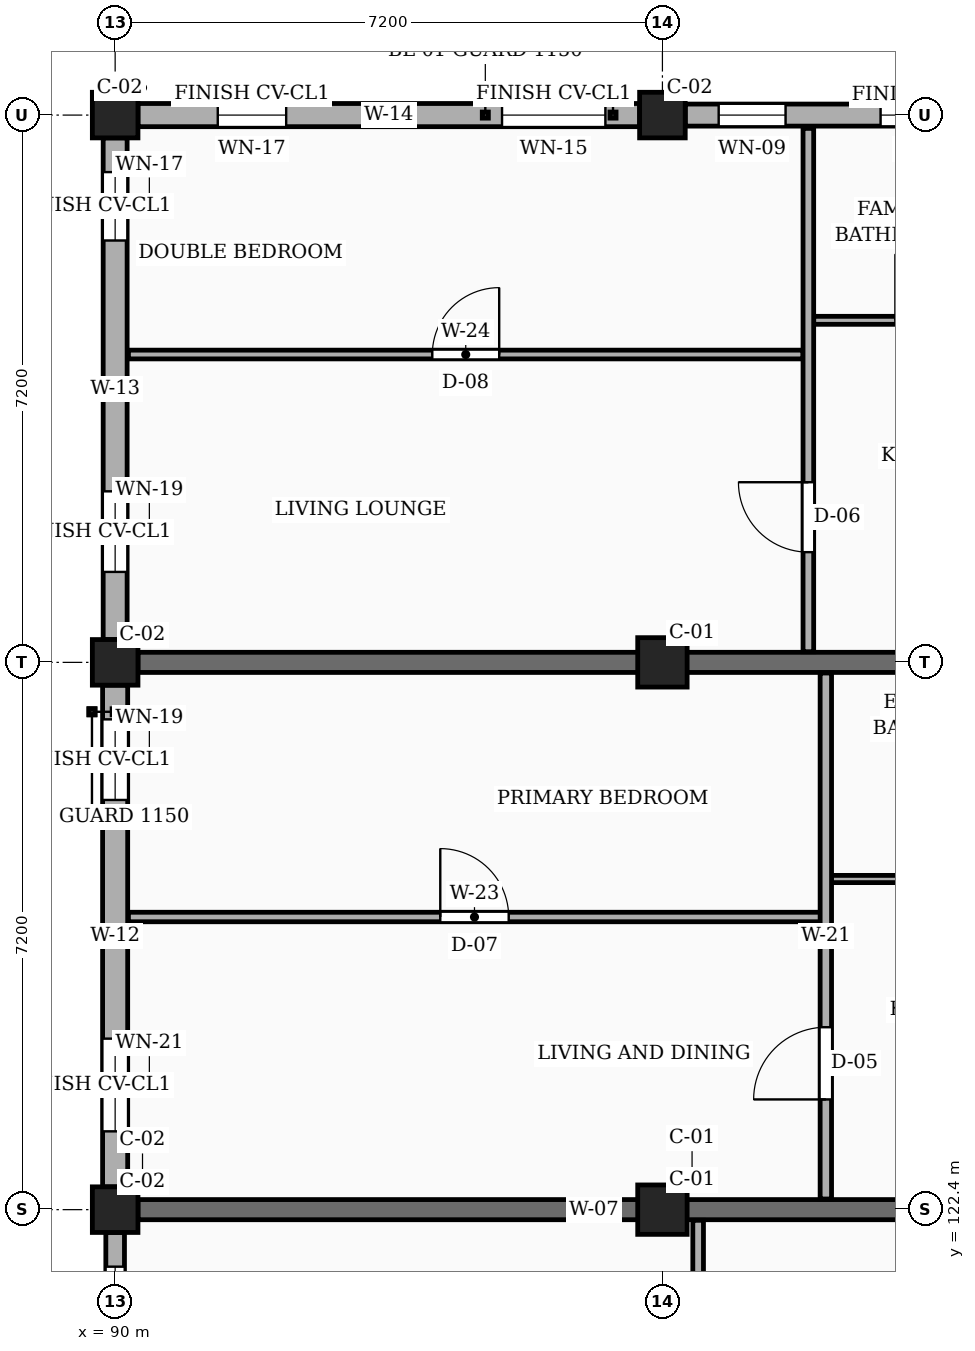
"""IFC4 building model, lengths in metres.
Left out: names, types, materials, properties, quantities, classifications, styles, units other than length and angle.
Written with IfcOpenShell. Run it as: python <this file> out.ifc"""

import sys

from ifc_helpers import new_model, si_unit, direction, frame, frame_2d, origin, origin_2d, place, context, subcontext, project, spatial, rectangle, extrude, element, fill, save


model = new_model("IFC4")
c1 = context("Model", 3, precision=1e-05, world=origin(), true_north=direction((0.0, 1.0)))
c2 = subcontext(c1, "Body", "Model", "MODEL_VIEW")
j1 = project(units=[si_unit("LENGTHUNIT", "METRE"), si_unit("PLANEANGLEUNIT", "RADIAN")], contexts=[c1])
p1 = place(None, origin())
s1 = spatial("IfcSite", under=j1, at=p1, CompositionType="ELEMENT")
p2 = place(p1, origin())
s2 = spatial("IfcBuilding", under=s1, at=p2, CompositionType="ELEMENT")
p3 = place(p2, frame((0.0, 0.0, 7.65)))
s3 = spatial("IfcBuildingStorey", under=s2, at=p3, CompositionType="ELEMENT", Elevation=7.65)
for number, where, z_axis, x_axis in (
    (1, (90.0, 122.4, 0.0), (0.0, 0.0, 1.0), (1.0, 0.0, 0.0)),
    (2, (90.0, 129.6, 0.0), (0.0, 0.0, 1.0), (1.0, 0.0, 0.0)),
    (3, (90.0, 136.8, 0.0), (0.0, 0.0, 1.0), (1.0, 0.0, 0.0)),
):
    element("IfcColumn", number, at=place(p3, frame(where, z_axis=z_axis, x_axis=x_axis)), inside=s3, PredefinedType="COLUMN", context=c2, shape_type="SweptSolid", body=[
        extrude(rectangle(XDim=0.6, YDim=0.6, at=origin_2d()), origin(), (0.0, 0.0, 1.0), 3.15),
    ])
for number, where, z_axis, x_axis in (
    (4, (97.2, 122.4, 0.0), (0.0, 0.0, 1.0), (1.0, 0.0, 0.0)),
    (5, (97.2, 129.6, 0.0), (0.0, 0.0, 1.0), (1.0, 0.0, 0.0)),
):
    element("IfcColumn", number, at=place(p3, frame(where, z_axis=z_axis, x_axis=x_axis)), inside=s3, PredefinedType="COLUMN", context=c2, shape_type="SweptSolid", body=[
        extrude(rectangle(XDim=0.65, YDim=0.65, at=origin_2d()), origin(), (0.0, 0.0, 1.0), 3.15),
    ])
p4 = place(p3, frame((97.2, 136.8, 0.0), z_axis=(0.0, 0.0, 1.0), x_axis=(1.0, 0.0, 0.0)))
e6 = element("IfcColumn", 6, at=p4, inside=s3, PredefinedType="COLUMN", context=c2, shape_type="SweptSolid", body=[
    extrude(rectangle(XDim=0.6, YDim=0.6, at=origin_2d()), origin(), (0.0, 0.0, 1.0), 3.15),
])
for number, where, z_axis, x_axis in (
    (7, (90.3, 122.4, 0.0), (0.0, 0.0, 1.0), (1.0, 0.0, 0.0)),
    (8, (90.3, 129.6, 0.0), (0.0, 0.0, 1.0), (1.0, 0.0, 0.0)),
):
    element("IfcWall", number, at=place(p3, frame(where, z_axis=z_axis, x_axis=x_axis)), inside=s3, PredefinedType="SOLIDWALL", context=c2, shape_type="SweptSolid", body=[
        extrude(rectangle(XDim=12.0, YDim=0.265, at=frame_2d((6.0, 0.0))), origin(), (0.0, 0.0, 1.0), 2.19),
    ])
p5 = place(p3, frame((104.1, 136.8, 0.0), z_axis=(0.0, 0.0, 1.0), x_axis=(-1.0, 0.0, 0.0)))
e9 = element("IfcWall", 9, at=p5, inside=s3, PredefinedType="SOLIDWALL", context=c2, shape_type="SweptSolid", body=[
    extrude(rectangle(XDim=6.6, YDim=0.29, at=frame_2d((3.3, 0.0))), origin(), (0.0, 0.0, 1.0), 2.46),
])
p6 = place(p5, frame((0.41, 0.0, 0.78)))
e10 = element("IfcOpeningElement", 10, at=p6, cuts=e9, PredefinedType="OPENING", context=c2, shape_type="SweptSolid", body=[
    extrude(rectangle(XDim=1.12, YDim=1.26, at=frame_2d((0.56, 0.63))), frame((0.0, 0.155, 0.0), z_axis=(0.0, -1.0, 0.0), x_axis=(1.0, 0.0, 0.0)), (0.0, 0.0, 1.0), 0.31),
])
p7 = place(p5, frame((2.75, 0.0, 0.78)))
e11 = element("IfcOpeningElement", 11, at=p7, cuts=e9, PredefinedType="OPENING", context=c2, shape_type="SweptSolid", body=[
    extrude(rectangle(XDim=1.28, YDim=1.26, at=frame_2d((0.64, 0.63))), frame((0.0, 0.155, 0.0), z_axis=(0.0, -1.0, 0.0), x_axis=(1.0, 0.0, 0.0)), (0.0, 0.0, 1.0), 0.31),
])
p8 = place(p5, frame((5.28, 0.0, 0.78)))
e12 = element("IfcOpeningElement", 12, at=p8, cuts=e9, PredefinedType="OPENING", context=c2, shape_type="SweptSolid", body=[
    extrude(rectangle(XDim=0.88, YDim=1.26, at=frame_2d((0.44, 0.63))), frame((0.0, 0.155, 0.0), z_axis=(0.0, -1.0, 0.0), x_axis=(1.0, 0.0, 0.0)), (0.0, 0.0, 1.0), 0.31),
])
p9 = place(p3, frame((96.9, 136.8, 0.0), z_axis=(0.0, 0.0, 1.0), x_axis=(-1.0, 0.0, 0.0)))
e13 = element("IfcWall", 13, at=p9, inside=s3, PredefinedType="SOLIDWALL", context=c2, shape_type="SweptSolid", body=[
    extrude(rectangle(XDim=6.6, YDim=0.305, at=frame_2d((3.3, 0.0))), origin(), (0.0, 0.0, 1.0), 2.46),
])
p10 = place(p9, frame((0.45, 0.0, 0.78)))
e14 = element("IfcOpeningElement", 14, at=p10, cuts=e13, PredefinedType="OPENING", context=c2, shape_type="SweptSolid", body=[
    extrude(rectangle(XDim=1.36, YDim=1.26, at=frame_2d((0.68, 0.63))), frame((0.0, 0.163, 0.0), z_axis=(0.0, -1.0, 0.0), x_axis=(1.0, 0.0, 0.0)), (0.0, 0.0, 1.0), 0.325),
])
p11 = place(p9, frame((4.65, 0.0, 0.78)))
e15 = element("IfcOpeningElement", 15, at=p11, cuts=e13, PredefinedType="OPENING", context=c2, shape_type="SweptSolid", body=[
    extrude(rectangle(XDim=0.9, YDim=1.36, at=frame_2d((0.45, 0.68))), frame((0.0, 0.163, 0.0), z_axis=(0.0, -1.0, 0.0), x_axis=(1.0, 0.0, 0.0)), (0.0, 0.0, 1.0), 0.325),
])
p12 = place(p3, frame((90.0, 136.5, 0.0), z_axis=(0.0, 0.0, 1.0), x_axis=(0.0, -1.0, 0.0)))
e16 = element("IfcWall", 16, at=p12, inside=s3, PredefinedType="SOLIDWALL", context=c2, shape_type="SweptSolid", body=[
    extrude(rectangle(XDim=6.6, YDim=0.315, at=frame_2d((3.3, 0.0))), origin(), (0.0, 0.0, 1.0), 2.46),
])
p13 = place(p12, frame((0.45, 0.0, 0.78)))
e17 = element("IfcOpeningElement", 17, at=p13, cuts=e16, PredefinedType="OPENING", context=c2, shape_type="SweptSolid", body=[
    extrude(rectangle(XDim=0.9, YDim=1.36, at=frame_2d((0.45, 0.68))), frame((0.0, 0.167, 0.0), z_axis=(0.0, -1.0, 0.0), x_axis=(1.0, 0.0, 0.0)), (0.0, 0.0, 1.0), 0.335),
])
p14 = place(p12, frame((4.65, 0.0, 0.78)))
e18 = element("IfcOpeningElement", 18, at=p14, cuts=e16, PredefinedType="OPENING", context=c2, shape_type="SweptSolid", body=[
    extrude(rectangle(XDim=1.06, YDim=1.36, at=frame_2d((0.53, 0.68))), frame((0.0, 0.167, 0.0), z_axis=(0.0, -1.0, 0.0), x_axis=(1.0, 0.0, 0.0)), (0.0, 0.0, 1.0), 0.335),
])
p15 = place(p3, frame((90.0, 129.3, 0.0), z_axis=(0.0, 0.0, 1.0), x_axis=(0.0, -1.0, 0.0)))
e19 = element("IfcWall", 19, at=p15, inside=s3, PredefinedType="SOLIDWALL", context=c2, shape_type="SweptSolid", body=[
    extrude(rectangle(XDim=6.6, YDim=0.33, at=frame_2d((3.3, 0.0))), origin(), (0.0, 0.0, 1.0), 2.46),
])
p16 = place(p15, frame((0.45, 0.0, 0.78)))
e20 = element("IfcOpeningElement", 20, at=p16, cuts=e19, PredefinedType="OPENING", context=c2, shape_type="SweptSolid", body=[
    extrude(rectangle(XDim=1.06, YDim=1.36, at=frame_2d((0.53, 0.68))), frame((0.0, 0.175, 0.0), z_axis=(0.0, -1.0, 0.0), x_axis=(1.0, 0.0, 0.0)), (0.0, 0.0, 1.0), 0.35),
])
p17 = place(p15, frame((4.65, 0.0, 0.78)))
e21 = element("IfcOpeningElement", 21, at=p17, cuts=e19, PredefinedType="OPENING", context=c2, shape_type="SweptSolid", body=[
    extrude(rectangle(XDim=1.22, YDim=1.36, at=frame_2d((0.61, 0.68))), frame((0.0, 0.175, 0.0), z_axis=(0.0, -1.0, 0.0), x_axis=(1.0, 0.0, 0.0)), (0.0, 0.0, 1.0), 0.35),
])
p18 = place(p3, frame((90.0, 122.1, 0.0), z_axis=(0.0, 0.0, 1.0), x_axis=(0.0, -1.0, 0.0)))
e22 = element("IfcWall", 22, at=p18, inside=s3, PredefinedType="SOLIDWALL", context=c2, shape_type="SweptSolid", body=[
    extrude(rectangle(XDim=6.6, YDim=0.245, at=frame_2d((3.3, 0.0))), origin(), (0.0, 0.0, 1.0), 2.46),
])
p19 = place(p18, frame((0.45, 0.0, 0.78)))
e23 = element("IfcOpeningElement", 23, at=p19, cuts=e22, PredefinedType="OPENING", context=c2, shape_type="SweptSolid", body=[
    extrude(rectangle(XDim=1.22, YDim=1.36, at=frame_2d((0.61, 0.68))), frame((0.0, 0.133, 0.0), z_axis=(0.0, -1.0, 0.0), x_axis=(1.0, 0.0, 0.0)), (0.0, 0.0, 1.0), 0.265),
])
p20 = place(p18, frame((4.65, 0.0, 0.78)))
e24 = element("IfcOpeningElement", 24, at=p20, cuts=e22, PredefinedType="OPENING", context=c2, shape_type="SweptSolid", body=[
    extrude(rectangle(XDim=1.38, YDim=1.36, at=frame_2d((0.69, 0.68))), frame((0.0, 0.133, 0.0), z_axis=(0.0, -1.0, 0.0), x_axis=(1.0, 0.0, 0.0)), (0.0, 0.0, 1.0), 0.265),
])
p21 = place(p3, frame((97.67, 115.34, 0.0), z_axis=(0.0, 0.0, 1.0), x_axis=(0.0, 1.0, 0.0)))
e25 = element("IfcWall", 25, at=p21, inside=s3, PredefinedType="PARTITIONING", context=c2, shape_type="SweptSolid", body=[
    extrude(rectangle(XDim=6.92, YDim=0.14, at=frame_2d((3.46, 0.0))), origin(), (0.0, 0.0, 1.0), 2.325),
])
p22 = place(p21, frame((4.66, 0.0, 0.0)))
e26 = element("IfcOpeningElement", 26, at=p22, cuts=e25, PredefinedType="OPENING", context=c2, shape_type="SweptSolid", body=[
    extrude(rectangle(XDim=0.95, YDim=2.1, at=frame_2d((0.475, 1.05))), frame((0.0, 0.08, 0.0), z_axis=(0.0, -1.0, 0.0), x_axis=(1.0, 0.0, 0.0)), (0.0, 0.0, 1.0), 0.16),
])
p23 = place(p3, frame((90.175, 126.25, 0.0), z_axis=(0.0, 0.0, 1.0), x_axis=(1.0, 0.0, 0.0)))
e27 = element("IfcWall", 27, at=p23, inside=s3, PredefinedType="PARTITIONING", context=c2, shape_type="SweptSolid", body=[
    extrude(rectangle(XDim=9.105, YDim=0.125, at=frame_2d((4.552, 0.0))), origin(), (0.0, 0.0, 1.0), 2.325),
])
p24 = place(p23, frame((4.103, 0.0, 0.0)))
e28 = element("IfcOpeningElement", 28, at=p24, cuts=e27, PredefinedType="OPENING", context=c2, shape_type="SweptSolid", body=[
    extrude(rectangle(XDim=0.9, YDim=2.1, at=frame_2d((0.45, 1.05))), frame((0.0, 0.073, 0.0), z_axis=(0.0, -1.0, 0.0), x_axis=(1.0, 0.0, 0.0)), (0.0, 0.0, 1.0), 0.145),
])
p25 = place(p3, frame((99.42, 126.75, 0.0), z_axis=(0.0, 0.0, 1.0), x_axis=(1.0, 0.0, 0.0)))
e29 = element("IfcWall", 29, at=p25, inside=s3, PredefinedType="PARTITIONING", context=c2, shape_type="SweptSolid", body=[
    extrude(rectangle(XDim=2.79, YDim=0.095, at=frame_2d((1.395, 0.0))), origin(), (0.0, 0.0, 1.0), 2.325),
])
p26 = place(p25, frame((0.945, 0.0, 0.0)))
e30 = element("IfcOpeningElement", 30, at=p26, cuts=e29, PredefinedType="OPENING", context=c2, shape_type="SweptSolid", body=[
    extrude(rectangle(XDim=0.9, YDim=2.05, at=frame_2d((0.45, 1.025))), frame((0.0, 0.058, 0.0), z_axis=(0.0, -1.0, 0.0), x_axis=(1.0, 0.0, 0.0)), (0.0, 0.0, 1.0), 0.115),
])
p27 = place(p3, frame((99.35, 122.54, 0.0), z_axis=(0.0, 0.0, 1.0), x_axis=(0.0, 1.0, 0.0)))
e31 = element("IfcWall", 31, at=p27, inside=s3, PredefinedType="PARTITIONING", context=c2, shape_type="SweptSolid", body=[
    extrude(rectangle(XDim=6.92, YDim=0.15, at=frame_2d((3.46, 0.0))), origin(), (0.0, 0.0, 1.0), 2.325),
])
p28 = place(p27, frame((1.31, 0.0, 0.0)))
e32 = element("IfcOpeningElement", 32, at=p28, cuts=e31, PredefinedType="OPENING", context=c2, shape_type="SweptSolid", body=[
    extrude(rectangle(XDim=0.95, YDim=2.1, at=frame_2d((0.475, 1.05))), frame((0.0, 0.085, 0.0), z_axis=(0.0, -1.0, 0.0), x_axis=(1.0, 0.0, 0.0)), (0.0, 0.0, 1.0), 0.17),
])
p29 = place(p3, frame((90.175, 133.65, 0.0), z_axis=(0.0, 0.0, 1.0), x_axis=(1.0, 0.0, 0.0)))
e33 = element("IfcWall", 33, at=p29, inside=s3, PredefinedType="PARTITIONING", context=c2, shape_type="SweptSolid", body=[
    extrude(rectangle(XDim=8.875, YDim=0.115, at=frame_2d((4.438, 0.0))), origin(), (0.0, 0.0, 1.0), 2.325),
])
p30 = place(p29, frame((3.998, 0.0, 0.0)))
e34 = element("IfcOpeningElement", 34, at=p30, cuts=e33, PredefinedType="OPENING", context=c2, shape_type="SweptSolid", body=[
    extrude(rectangle(XDim=0.88, YDim=2.08, at=frame_2d((0.44, 1.04))), frame((0.0, 0.067, 0.0), z_axis=(0.0, -1.0, 0.0), x_axis=(1.0, 0.0, 0.0)), (0.0, 0.0, 1.0), 0.135),
])
p31 = place(p3, frame((99.19, 134.1, 0.0), z_axis=(0.0, 0.0, 1.0), x_axis=(1.0, 0.0, 0.0)))
e35 = element("IfcWall", 35, at=p31, inside=s3, PredefinedType="PARTITIONING", context=c2, shape_type="SweptSolid", body=[
    extrude(rectangle(XDim=3.02, YDim=0.105, at=frame_2d((1.51, 0.0))), origin(), (0.0, 0.0, 1.0), 2.325),
])
p32 = place(p31, frame((1.075, 0.0, 0.0)))
e36 = element("IfcOpeningElement", 36, at=p32, cuts=e35, PredefinedType="OPENING", context=c2, shape_type="SweptSolid", body=[
    extrude(rectangle(XDim=0.87, YDim=2.05, at=frame_2d((0.435, 1.025))), frame((0.0, 0.062, 0.0), z_axis=(0.0, -1.0, 0.0), x_axis=(1.0, 0.0, 0.0)), (0.0, 0.0, 1.0), 0.125),
])
p33 = place(p3, frame((99.12, 129.74, 0.0), z_axis=(0.0, 0.0, 1.0), x_axis=(0.0, 1.0, 0.0)))
e37 = element("IfcWall", 37, at=p33, inside=s3, PredefinedType="PARTITIONING", context=c2, shape_type="SweptSolid", body=[
    extrude(rectangle(XDim=6.885, YDim=0.14, at=frame_2d((3.442, 0.0))), origin(), (0.0, 0.0, 1.0), 2.325),
])
p34 = place(p33, frame((1.31, 0.0, 0.0)))
e38 = element("IfcOpeningElement", 38, at=p34, cuts=e37, PredefinedType="OPENING", context=c2, shape_type="SweptSolid", body=[
    extrude(rectangle(XDim=0.92, YDim=2.1, at=frame_2d((0.46, 1.05))), frame((0.0, 0.08, 0.0), z_axis=(0.0, -1.0, 0.0), x_axis=(1.0, 0.0, 0.0)), (0.0, 0.0, 1.0), 0.16),
])
p35 = place(p7, origin())
e39 = element("IfcWindow", 39, at=p35, inside=s3, PartitioningType="SINGLE_PANEL", PredefinedType="WINDOW", context=c2, shape_type="SweptSolid", body=[
    extrude(rectangle(XDim=1.28, YDim=1.26, at=frame_2d((0.64, 0.63))), frame((0.0, 0.03, 0.0), z_axis=(0.0, -1.0, 0.0), x_axis=(1.0, 0.0, 0.0)), (0.0, 0.0, 1.0), 0.06),
])
fill(e11, e39)
p36 = place(p8, origin())
e40 = element("IfcWindow", 40, at=p36, inside=s3, PartitioningType="SINGLE_PANEL", PredefinedType="WINDOW", context=c2, shape_type="SweptSolid", body=[
    extrude(rectangle(XDim=0.88, YDim=1.26, at=frame_2d((0.44, 0.63))), frame((0.0, 0.03, 0.0), z_axis=(0.0, -1.0, 0.0), x_axis=(1.0, 0.0, 0.0)), (0.0, 0.0, 1.0), 0.06),
])
fill(e12, e40)
p37 = place(p10, origin())
e41 = element("IfcWindow", 41, at=p37, inside=s3, PartitioningType="SINGLE_PANEL", PredefinedType="WINDOW", context=c2, shape_type="SweptSolid", body=[
    extrude(rectangle(XDim=1.36, YDim=1.26, at=frame_2d((0.68, 0.63))), frame((0.0, 0.03, 0.0), z_axis=(0.0, -1.0, 0.0), x_axis=(1.0, 0.0, 0.0)), (0.0, 0.0, 1.0), 0.06),
])
fill(e14, e41)
p38 = place(p11, origin())
e42 = element("IfcWindow", 42, at=p38, inside=s3, PartitioningType="SINGLE_PANEL", PredefinedType="WINDOW", context=c2, shape_type="SweptSolid", body=[
    extrude(rectangle(XDim=0.9, YDim=1.36, at=frame_2d((0.45, 0.68))), frame((0.0, 0.03, 0.0), z_axis=(0.0, -1.0, 0.0), x_axis=(1.0, 0.0, 0.0)), (0.0, 0.0, 1.0), 0.06),
])
fill(e15, e42)
p39 = place(p13, origin())
e43 = element("IfcWindow", 43, at=p39, inside=s3, PartitioningType="SINGLE_PANEL", PredefinedType="WINDOW", context=c2, shape_type="SweptSolid", body=[
    extrude(rectangle(XDim=0.9, YDim=1.36, at=frame_2d((0.45, 0.68))), frame((0.0, 0.03, 0.0), z_axis=(0.0, -1.0, 0.0), x_axis=(1.0, 0.0, 0.0)), (0.0, 0.0, 1.0), 0.06),
])
fill(e17, e43)
p40 = place(p14, origin())
e44 = element("IfcWindow", 44, at=p40, inside=s3, PartitioningType="SINGLE_PANEL", PredefinedType="WINDOW", context=c2, shape_type="SweptSolid", body=[
    extrude(rectangle(XDim=1.06, YDim=1.36, at=frame_2d((0.53, 0.68))), frame((0.0, 0.03, 0.0), z_axis=(0.0, -1.0, 0.0), x_axis=(1.0, 0.0, 0.0)), (0.0, 0.0, 1.0), 0.06),
])
fill(e18, e44)
p41 = place(p16, origin())
e45 = element("IfcWindow", 45, at=p41, inside=s3, PartitioningType="SINGLE_PANEL", PredefinedType="WINDOW", context=c2, shape_type="SweptSolid", body=[
    extrude(rectangle(XDim=1.06, YDim=1.36, at=frame_2d((0.53, 0.68))), frame((0.0, 0.03, 0.0), z_axis=(0.0, -1.0, 0.0), x_axis=(1.0, 0.0, 0.0)), (0.0, 0.0, 1.0), 0.06),
])
fill(e20, e45)
p42 = place(p17, origin())
e46 = element("IfcWindow", 46, at=p42, inside=s3, PartitioningType="SINGLE_PANEL", PredefinedType="WINDOW", context=c2, shape_type="SweptSolid", body=[
    extrude(rectangle(XDim=1.22, YDim=1.36, at=frame_2d((0.61, 0.68))), frame((0.0, 0.03, 0.0), z_axis=(0.0, -1.0, 0.0), x_axis=(1.0, 0.0, 0.0)), (0.0, 0.0, 1.0), 0.06),
])
fill(e21, e46)
p43 = place(p19, origin())
e47 = element("IfcWindow", 47, at=p43, inside=s3, PartitioningType="SINGLE_PANEL", PredefinedType="WINDOW", context=c2, shape_type="SweptSolid", body=[
    extrude(rectangle(XDim=1.22, YDim=1.36, at=frame_2d((0.61, 0.68))), frame((0.0, 0.03, 0.0), z_axis=(0.0, -1.0, 0.0), x_axis=(1.0, 0.0, 0.0)), (0.0, 0.0, 1.0), 0.06),
])
fill(e23, e47)
p44 = place(p24, origin())
e48 = element("IfcDoor", 48, at=p44, inside=s3, OperationType="SINGLE_SWING_LEFT", PredefinedType="DOOR", context=c2, shape_type="SweptSolid", body=[
    extrude(rectangle(XDim=0.9, YDim=2.1, at=frame_2d((0.45, 1.05))), frame((0.0, 0.025, 0.0), z_axis=(0.0, -1.0, 0.0), x_axis=(1.0, 0.0, 0.0)), (0.0, 0.0, 1.0), 0.05),
])
fill(e28, e48)
p45 = place(p28, origin())
e49 = element("IfcDoor", 49, at=p45, inside=s3, OperationType="SINGLE_SWING_LEFT", PredefinedType="DOOR", context=c2, shape_type="SweptSolid", body=[
    extrude(rectangle(XDim=0.95, YDim=2.1, at=frame_2d((0.475, 1.05))), frame((0.0, 0.025, 0.0), z_axis=(0.0, -1.0, 0.0), x_axis=(1.0, 0.0, 0.0)), (0.0, 0.0, 1.0), 0.05),
])
fill(e32, e49)
p46 = place(p30, origin())
e50 = element("IfcDoor", 50, at=p46, inside=s3, OperationType="SINGLE_SWING_RIGHT", PredefinedType="DOOR", context=c2, shape_type="SweptSolid", body=[
    extrude(rectangle(XDim=0.88, YDim=2.08, at=frame_2d((0.44, 1.04))), frame((0.0, 0.025, 0.0), z_axis=(0.0, -1.0, 0.0), x_axis=(1.0, 0.0, 0.0)), (0.0, 0.0, 1.0), 0.05),
])
fill(e34, e50)
p47 = place(p32, origin())
e51 = element("IfcDoor", 51, at=p47, inside=s3, OperationType="SINGLE_SWING_LEFT", PredefinedType="DOOR", context=c2, shape_type="SweptSolid", body=[
    extrude(rectangle(XDim=0.87, YDim=2.05, at=frame_2d((0.435, 1.025))), frame((0.0, 0.025, 0.0), z_axis=(0.0, -1.0, 0.0), x_axis=(1.0, 0.0, 0.0)), (0.0, 0.0, 1.0), 0.05),
])
fill(e36, e51)
p48 = place(p34, origin())
e52 = element("IfcDoor", 52, at=p48, inside=s3, OperationType="SINGLE_SWING_RIGHT", PredefinedType="DOOR", context=c2, shape_type="SweptSolid", body=[
    extrude(rectangle(XDim=0.92, YDim=2.1, at=frame_2d((0.46, 1.05))), frame((0.0, 0.025, 0.0), z_axis=(0.0, -1.0, 0.0), x_axis=(1.0, 0.0, 0.0)), (0.0, 0.0, 1.0), 0.05),
])
fill(e38, e52)
save(model, sys.argv[1])
